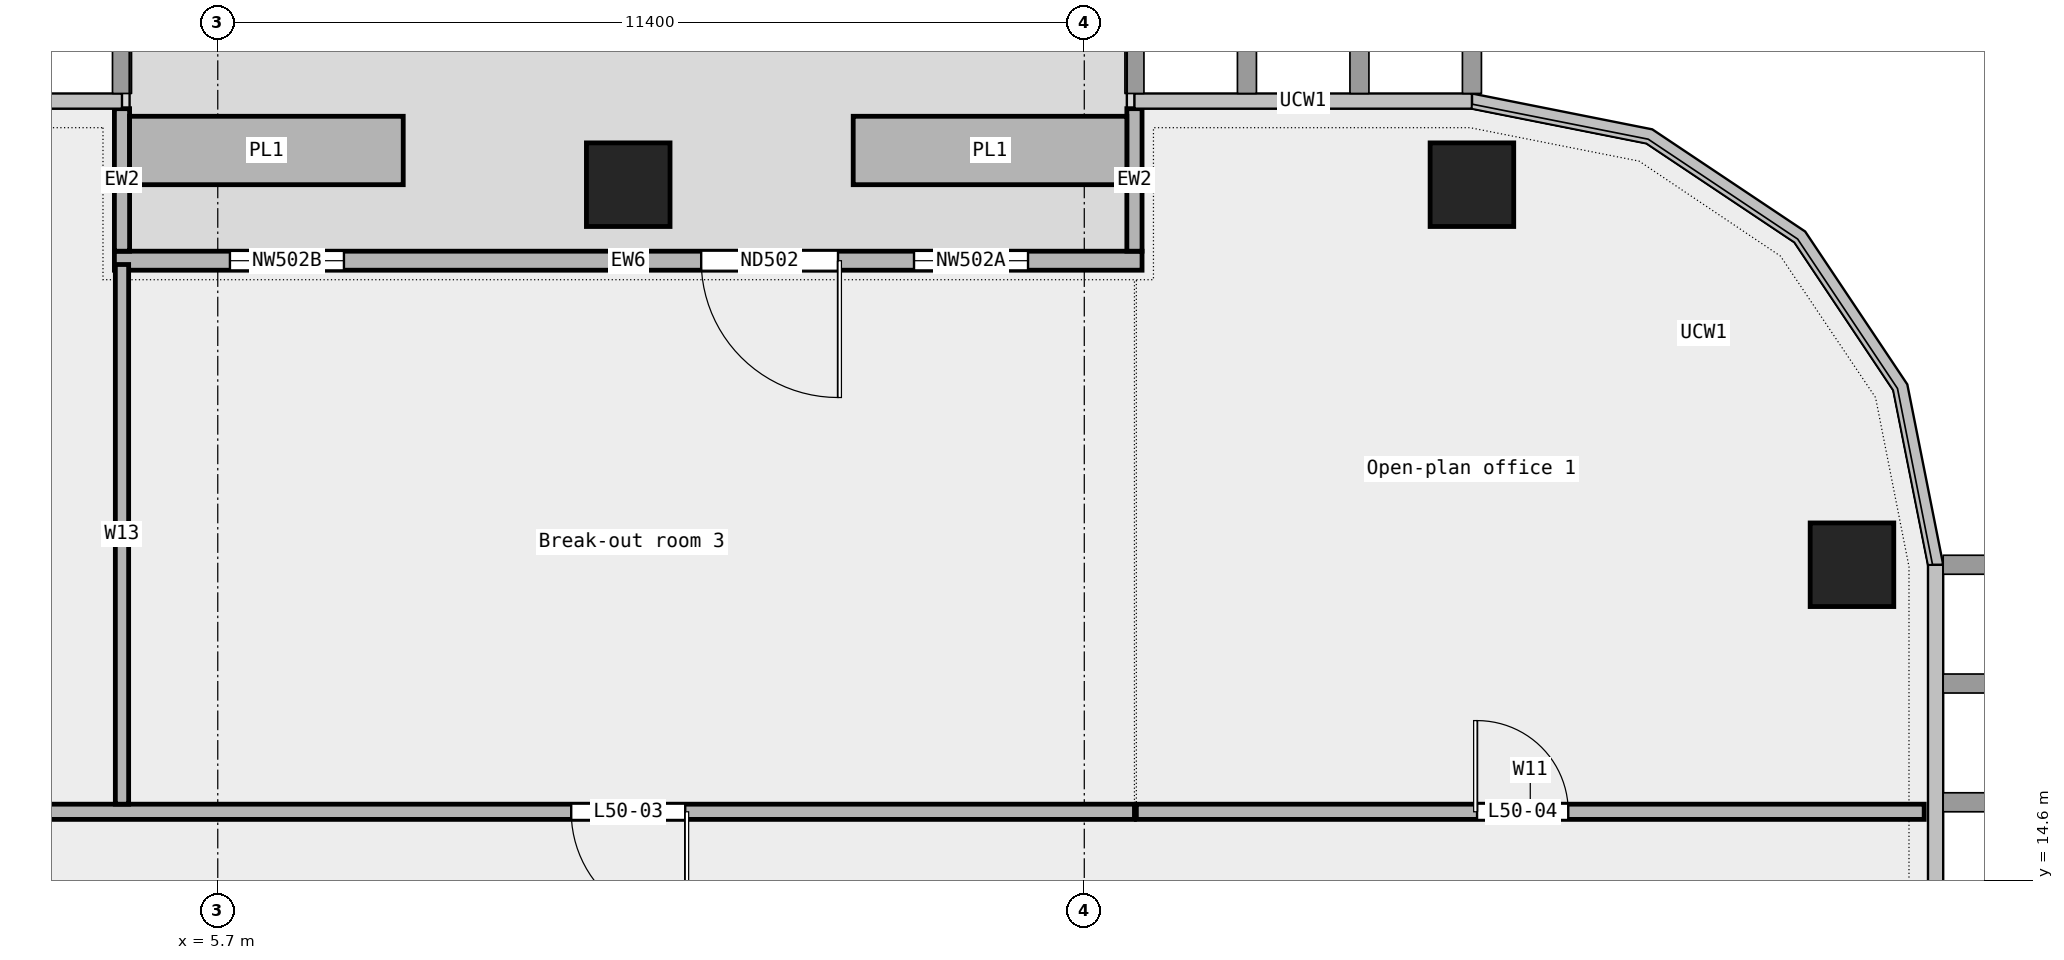
"""IFC4 building model, lengths in metres.
Left out: names, types, materials, properties, quantities, classifications, styles, units other than length and angle.
Written with IfcOpenShell. Run it as: python <this file> out.ifc"""

import sys

from ifc_helpers import new_model, si_unit, direction, frame, frame_2d, origin, origin_2d, place, context, subcontext, project, spatial, rectangle, extrude, element, fill, save


model = new_model("IFC4")
c1 = context("Model", 3, precision=1e-05, world=origin(), true_north=direction((0.0, 1.0)))
c2 = subcontext(c1, "Body", "Model", "MODEL_VIEW")
j1 = project(units=[si_unit("LENGTHUNIT", "METRE"), si_unit("PLANEANGLEUNIT", "RADIAN")], contexts=[c1])
p1 = place(None, origin())
s1 = spatial("IfcSite", under=j1, at=p1, CompositionType="ELEMENT")
p2 = place(p1, origin())
s2 = spatial("IfcBuilding", under=s1, at=p2, CompositionType="ELEMENT")
p3 = place(p2, frame((0.0, 0.0, 235.0)))
s3 = spatial("IfcBuildingStorey", under=s2, at=p3, CompositionType="ELEMENT", Elevation=235.0)
for number, where, z_axis, x_axis in (
    (1, (27.2, 18.75, 0.0), (0.0, 0.0, 1.0), (1.0, 0.0, 0.0)),
    (2, (22.2, 23.75, 0.0), (0.0, 0.0, 1.0), (1.0, 0.0, 0.0)),
    (3, (11.1, 23.75, 0.0), (0.0, 0.0, 1.0), (1.0, 0.0, 0.0)),
):
    element("IfcColumn", number, at=place(p3, frame(where, z_axis=z_axis, x_axis=x_axis)), inside=s3, PredefinedType="COLUMN", context=c2, shape_type="SweptSolid", body=[
        extrude(rectangle(XDim=1.1, YDim=1.1, at=origin_2d()), origin(), (0.0, 0.0, 1.0), 3.6),
    ])
p4 = place(p3, frame((17.86, 22.75, 0.0), z_axis=(0.0, 0.0, 1.0), x_axis=(-1.0, 0.0, 0.0)))
e4 = element("IfcWall", 4, at=p4, inside=s3, PredefinedType="STANDARD", context=c2, shape_type="SweptSolid", body=[
    extrude(rectangle(XDim=13.52, YDim=0.25, at=frame_2d((6.76, 0.0))), origin(), (0.0, 0.0, 1.0), 3.6),
])
p5 = place(p4, frame((1.5, 0.0, 0.45)))
e5 = element("IfcOpeningElement", 5, at=p5, cuts=e4, PredefinedType="OPENING", context=c2, shape_type="SweptSolid", body=[
    extrude(rectangle(XDim=1.5, YDim=2.4, at=frame_2d((0.75, 1.2))), frame((0.0, 0.137, 0.0), z_axis=(0.0, -1.0, 0.0), x_axis=(1.0, 0.0, 0.0)), (0.0, 0.0, 1.0), 0.274),
])
p6 = place(p4, frame((4.0, 0.0, 0.0)))
e6 = element("IfcOpeningElement", 6, at=p6, cuts=e4, PredefinedType="OPENING", context=c2, shape_type="SweptSolid", body=[
    extrude(rectangle(XDim=1.8, YDim=2.4, at=frame_2d((0.9, 1.2))), frame((0.0, 0.137, 0.0), z_axis=(0.0, -1.0, 0.0), x_axis=(1.0, 0.0, 0.0)), (0.0, 0.0, 1.0), 0.274),
])
p7 = place(p4, frame((10.5, 0.0, 0.45)))
e7 = element("IfcOpeningElement", 7, at=p7, cuts=e4, PredefinedType="OPENING", context=c2, shape_type="SweptSolid", body=[
    extrude(rectangle(XDim=1.5, YDim=2.4, at=frame_2d((0.75, 1.2))), frame((0.0, 0.137, 0.0), z_axis=(0.0, -1.0, 0.0), x_axis=(1.0, 0.0, 0.0)), (0.0, 0.0, 1.0), 0.274),
])
for number, where, z_axis, x_axis in (
    (8, (17.76, 24.75, 0.0), (0.0, 0.0, 1.0), (0.0, -1.0, 0.0)),
    (9, (4.44, 24.75, 0.0), (0.0, 0.0, 1.0), (0.0, -1.0, 0.0)),
):
    element("IfcWall", number, at=place(p3, frame(where, z_axis=z_axis, x_axis=x_axis)), inside=s3, PredefinedType="STANDARD", context=c2, shape_type="SweptSolid", body=[
        extrude(rectangle(XDim=1.875, YDim=0.2, at=frame_2d((0.938, 0.0))), origin(), (0.0, 0.0, 1.0), 3.6),
    ])
for number, where, z_axis, x_axis in (
    (10, (17.66, 24.2, 0.0), (0.0, 0.0, 1.0), (-1.0, 0.0, 0.0)),
    (11, (8.14, 24.2, 0.0), (0.0, 0.0, 1.0), (-1.0, 0.0, 0.0)),
):
    element("IfcWall", number, at=place(p3, frame(where, z_axis=z_axis, x_axis=x_axis)), inside=s3, PredefinedType="STANDARD", context=c2, shape_type="SweptSolid", body=[
        extrude(rectangle(XDim=3.6, YDim=0.9, at=frame_2d((1.8, 0.0))), origin(), (0.0, 0.0, 1.0), 0.7),
    ])
p8 = place(p3, frame((-28.15, 15.5, 0.0), z_axis=(0.0, 0.0, 1.0), x_axis=(1.0, 0.0, 0.0)))
e12 = element("IfcWall", 12, at=p8, inside=s3, PredefinedType="PARTITIONING", context=c2, shape_type="SweptSolid", body=[
    extrude(rectangle(XDim=45.91, YDim=0.2, at=frame_2d((22.955, 0.0))), origin(), (0.0, 0.0, 1.0), 3.6),
])
p9 = place(p8, frame((38.5, 0.0, 0.0)))
e13 = element("IfcOpeningElement", 13, at=p9, cuts=e12, PredefinedType="OPENING", context=c2, shape_type="SweptSolid", body=[
    extrude(rectangle(XDim=1.5, YDim=2.1, at=frame_2d((0.75, 1.05))), frame((0.0, 0.112, 0.0), z_axis=(0.0, -1.0, 0.0), x_axis=(1.0, 0.0, 0.0)), (0.0, 0.0, 1.0), 0.224),
])
p10 = place(p8, frame((9.462, 0.0, 0.0)))
e14 = element("IfcOpeningElement", 14, at=p10, cuts=e12, PredefinedType="OPENING", context=c2, shape_type="SweptSolid", body=[
    extrude(rectangle(XDim=1.8, YDim=2.1, at=frame_2d((0.9, 1.05))), frame((0.0, 0.112, 0.0), z_axis=(0.0, -1.0, 0.0), x_axis=(1.0, 0.0, 0.0)), (0.0, 0.0, 1.0), 0.224),
])
p11 = place(p8, frame((25.808, 0.0, 0.0)))
e15 = element("IfcOpeningElement", 15, at=p11, cuts=e12, PredefinedType="OPENING", context=c2, shape_type="SweptSolid", body=[
    extrude(rectangle(XDim=1.5, YDim=2.1, at=frame_2d((0.75, 1.05))), frame((0.0, 0.112, 0.0), z_axis=(0.0, -1.0, 0.0), x_axis=(1.0, 0.0, 0.0)), (0.0, 0.0, 1.0), 0.224),
])
p12 = place(p3, frame((17.785, 15.5, 0.0), z_axis=(0.0, 0.0, 1.0), x_axis=(1.0, 0.0, 0.0)))
e16 = element("IfcWall", 16, at=p12, inside=s3, PredefinedType="PARTITIONING", context=c2, shape_type="SweptSolid", body=[
    extrude(rectangle(XDim=10.365, YDim=0.2, at=frame_2d((5.183, 0.0))), origin(), (0.0, 0.0, 1.0), 3.6),
])
p13 = place(p12, frame((4.482, 0.0, 0.0)))
e17 = element("IfcOpeningElement", 17, at=p13, cuts=e16, PredefinedType="OPENING", context=c2, shape_type="SweptSolid", body=[
    extrude(rectangle(XDim=1.2, YDim=2.1, at=frame_2d((0.6, 1.05))), frame((0.0, 0.112, 0.0), z_axis=(0.0, -1.0, 0.0), x_axis=(1.0, 0.0, 0.0)), (0.0, 0.0, 1.0), 0.224),
])
p14 = place(p3, frame((4.44, 15.6, 0.0), z_axis=(0.0, 0.0, 1.0), x_axis=(0.0, 1.0, 0.0)))
e18 = element("IfcWall", 18, at=p14, inside=s3, PredefinedType="PARTITIONING", context=c2, shape_type="SweptSolid", body=[
    extrude(rectangle(XDim=7.1, YDim=0.175, at=frame_2d((3.55, 0.0))), origin(), (0.0, 0.0, 1.0), 3.6),
])
p15 = place(p5, origin())
e19 = element("IfcWindow", 19, at=p15, inside=s3, PartitioningType="SINGLE_PANEL", PredefinedType="WINDOW", context=c2, shape_type="SweptSolid", body=[
    extrude(rectangle(XDim=1.5, YDim=2.4, at=frame_2d((0.75, 1.2))), frame((0.0, 0.03, 0.0), z_axis=(0.0, -1.0, 0.0), x_axis=(1.0, 0.0, 0.0)), (0.0, 0.0, 1.0), 0.06),
])
fill(e5, e19)
p16 = place(p6, origin())
e20 = element("IfcDoor", 20, at=p16, inside=s3, OperationType="DOUBLE_DOOR_SINGLE_SWING", PredefinedType="DOOR", context=c2, shape_type="SweptSolid", body=[
    extrude(rectangle(XDim=1.8, YDim=2.4, at=frame_2d((0.9, 1.2))), frame((0.0, 0.025, 0.0), z_axis=(0.0, -1.0, 0.0), x_axis=(1.0, 0.0, 0.0)), (0.0, 0.0, 1.0), 0.05),
])
fill(e6, e20)
p17 = place(p7, origin())
e21 = element("IfcWindow", 21, at=p17, inside=s3, PartitioningType="SINGLE_PANEL", PredefinedType="WINDOW", context=c2, shape_type="SweptSolid", body=[
    extrude(rectangle(XDim=1.5, YDim=2.4, at=frame_2d((0.75, 1.2))), frame((0.0, 0.03, 0.0), z_axis=(0.0, -1.0, 0.0), x_axis=(1.0, 0.0, 0.0)), (0.0, 0.0, 1.0), 0.06),
])
fill(e7, e21)
p18 = place(p9, origin())
e22 = element("IfcDoor", 22, at=p18, inside=s3, OperationType="DOUBLE_DOOR_SINGLE_SWING", PredefinedType="DOOR", context=c2, shape_type="SweptSolid", body=[
    extrude(rectangle(XDim=1.5, YDim=2.1, at=frame_2d((0.75, 1.05))), frame((0.0, 0.025, 0.0), z_axis=(0.0, -1.0, 0.0), x_axis=(1.0, 0.0, 0.0)), (0.0, 0.0, 1.0), 0.05),
])
fill(e13, e22)
p19 = place(p13, origin())
e23 = element("IfcDoor", 23, at=p19, inside=s3, OperationType="SINGLE_SWING_LEFT", PredefinedType="DOOR", context=c2, shape_type="SweptSolid", body=[
    extrude(rectangle(XDim=1.2, YDim=2.1, at=frame_2d((0.6, 1.05))), frame((0.0, 0.025, 0.0), z_axis=(0.0, -1.0, 0.0), x_axis=(1.0, 0.0, 0.0)), (0.0, 0.0, 1.0), 0.05),
])
fill(e17, e23)
save(model, sys.argv[1])
